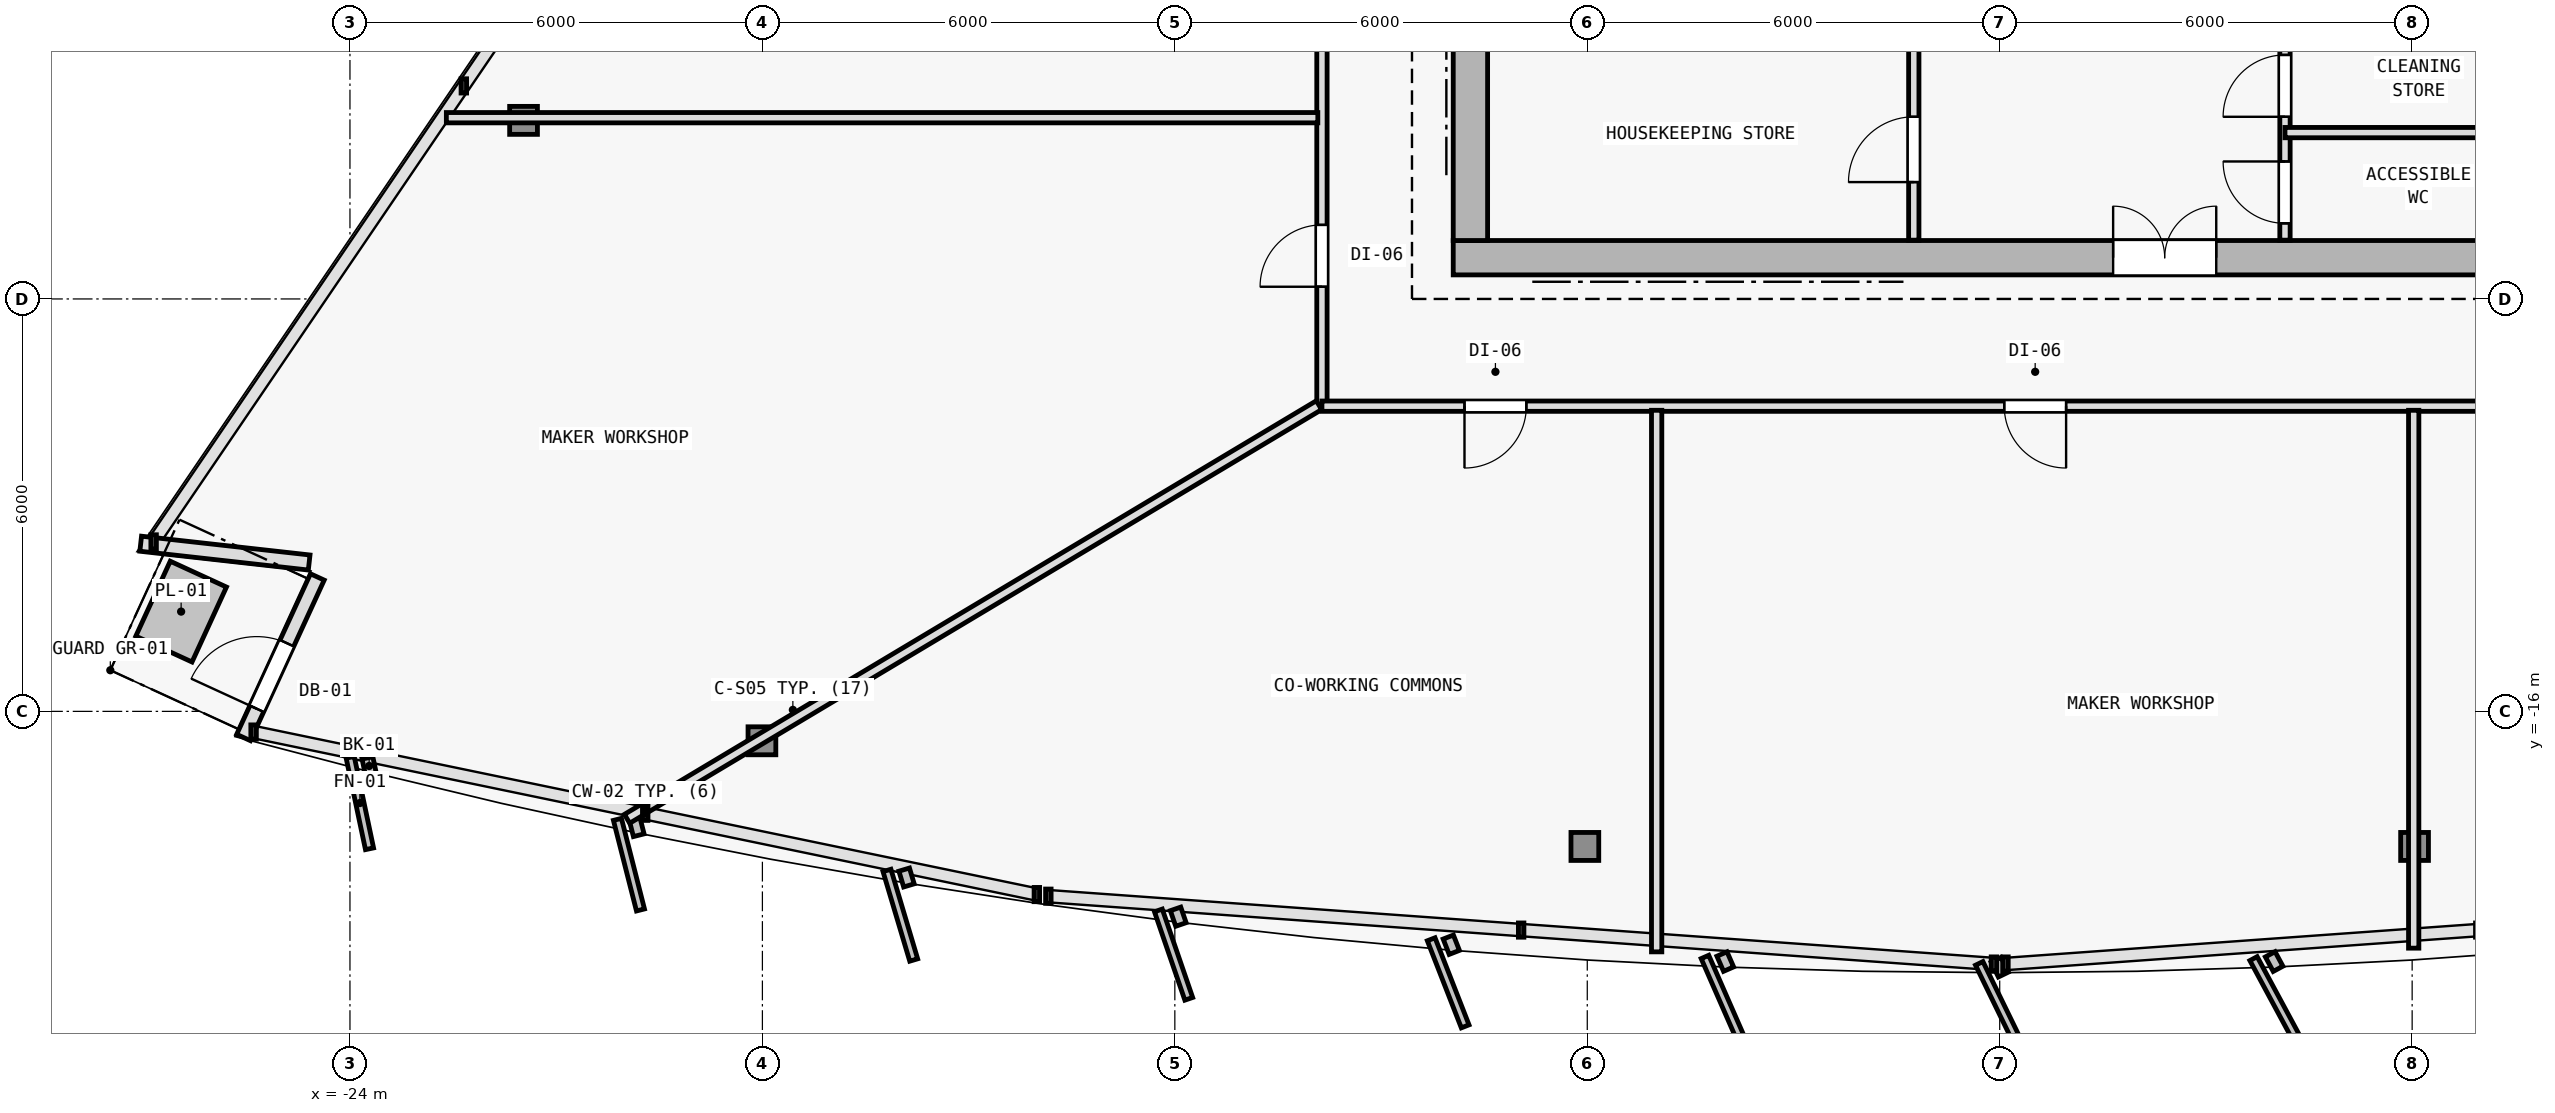
"""IFC4 building model, lengths in metres.
Left out: names, types, materials, properties, quantities, classifications, styles, units other than length and angle.
Written with IfcOpenShell. Run it as: python <this file> out.ifc"""

import sys

from ifc_helpers import new_model, si_unit, direction, frame, frame_2d, origin, origin_2d, place, context, subcontext, project, spatial, rectangle, i_section, extrude, element, fill, save


model = new_model("IFC4")
c1 = context("Model", 3, precision=1e-05, world=origin(), true_north=direction((0.0, 1.0)))
c2 = subcontext(c1, "Body", "Model", "MODEL_VIEW")
j1 = project(units=[si_unit("LENGTHUNIT", "METRE"), si_unit("PLANEANGLEUNIT", "RADIAN")], contexts=[c1])
p1 = place(None, origin())
s1 = spatial("IfcSite", under=j1, at=p1, CompositionType="ELEMENT")
p2 = place(p1, origin())
s2 = spatial("IfcBuilding", under=s1, at=p2, CompositionType="ELEMENT")
p3 = place(p2, frame((0.0, 0.0, 145.8)))
s3 = spatial("IfcBuildingStorey", under=s2, at=p3, CompositionType="ELEMENT", Elevation=145.8)
for number, where, z_axis, x_axis in (
    (1, (-7.7, -9.4, 0.0), (0.0, 0.0, 1.0), (1.0, 0.0, 0.0)),
    (2, (0.0, -9.4, 0.0), (0.0, 0.0, 1.0), (1.0, 0.0, 0.0)),
):
    element("IfcColumn", number, at=place(p3, frame(where, z_axis=z_axis, x_axis=x_axis)), inside=s3, PredefinedType="COLUMN", context=c2, shape_type="SweptSolid", body=[
        extrude(i_section(OverallWidth=0.404, OverallDepth=0.407, WebThickness=0.017, FlangeThickness=0.028, FilletRadius=0.015, at=origin_2d()), origin(), (0.0, 0.0, 1.0), 3.6),
    ])
p4 = place(p3, frame((-18.007, -16.428, 0.005), z_axis=(0.020662834962, 0.033509136961, 0.999224792022), x_axis=(-0.851183725565, 0.524867855115, 0.0)))
e3 = element("IfcColumn", 3, at=p4, inside=s3, PredefinedType="COLUMN", context=c2, shape_type="SweptSolid", body=[
    extrude(i_section(OverallWidth=0.404, OverallDepth=0.407, WebThickness=0.017, FlangeThickness=0.028, FilletRadius=0.015, at=origin_2d()), origin(), (0.0, 0.0, 1.0), 3.592),
])
for number, where, z_axis, x_axis in (
    (4, (-6.035, -17.965, 0.005), (0.007, 0.035, 0.999), (-0.982, 0.191, 0.0)),
    (5, (6.035, -17.965, 0.005), (-0.007, 0.035, 0.999), (-0.982, -0.191, 0.0)),
):
    element("IfcColumn", number, at=place(p3, frame(where, z_axis=z_axis, x_axis=x_axis)), inside=s3, PredefinedType="COLUMN", context=c2, shape_type="SweptSolid", body=[
        extrude(i_section(OverallWidth=0.404, OverallDepth=0.407, WebThickness=0.017, FlangeThickness=0.028, FilletRadius=0.015, at=origin_2d()), origin(), (0.0, 0.0, 1.0), 3.592),
    ])
p5 = place(p3, frame((-21.475, -7.402, 0.005), z_axis=(0.025222449659, 0.021619242565, 0.999448065876), x_axis=(-0.650791373456, 0.759256602365, 0.0)))
e6 = element("IfcColumn", 6, at=p5, inside=s3, PredefinedType="COLUMN", context=c2, shape_type="SweptSolid", body=[
    extrude(i_section(OverallWidth=0.404, OverallDepth=0.407, WebThickness=0.017, FlangeThickness=0.028, FilletRadius=0.015, at=origin_2d()), origin(), (0.0, 0.0, 1.0), 3.591),
])
p6 = place(p3, frame((-24.594, -13.834, 0.0), z_axis=(0.0, 0.0, 1.0), x_axis=(-0.993823222634, 0.110974781609, 0.0)))
e7 = element("IfcWall", 7, at=p6, inside=s3, PredefinedType="SOLIDWALL", context=c2, shape_type="SweptSolid", body=[
    extrude(rectangle(XDim=2.466, YDim=0.22, at=frame_2d((1.233, 0.0))), origin(), (0.0, 0.0, 1.0), 3.35),
])
p7 = place(p3, frame((-25.548, -16.38, 0.0), z_axis=(0.0, 0.0, 1.0), x_axis=(0.417449299542, 0.908700215864, 0.0)))
e8 = element("IfcWall", 8, at=p7, inside=s3, PredefinedType="SOLIDWALL", context=c2, shape_type="SweptSolid", body=[
    extrude(rectangle(XDim=2.57, YDim=0.22, at=frame_2d((1.285, 0.0))), origin(), (0.0, 0.0, 1.0), 3.35),
])
p8 = place(p7, frame((0.46, 0.0, 0.0)))
e9 = element("IfcOpeningElement", 9, at=p8, cuts=e8, PredefinedType="OPENING", context=c2, shape_type="SweptSolid", body=[
    extrude(rectangle(XDim=1.05, YDim=2.15, at=frame_2d((0.525, 1.075))), frame((0.0, 0.12, 0.0), z_axis=(0.0, -1.0, 0.0), x_axis=(1.0, 0.0, 0.0)), (0.0, 0.0, 1.0), 0.24),
])
p9 = place(p3, frame((-7.95, -9.4, 0.0), z_axis=(0.0, 0.0, 1.0), x_axis=(1.0, 0.0, 0.0)))
e10 = element("IfcWall", 10, at=p9, inside=s3, PredefinedType="SHEAR", context=c2, shape_type="SweptSolid", body=[
    extrude(rectangle(XDim=15.9, YDim=0.5, at=frame_2d((7.95, 0.0))), origin(), (0.0, 0.0, 1.0), 3.35),
])
p10 = place(p9, frame((9.6, 0.0, 0.0)))
e11 = element("IfcOpeningElement", 11, at=p10, cuts=e10, PredefinedType="OPENING", context=c2, shape_type="SweptSolid", body=[
    extrude(rectangle(XDim=1.5, YDim=2.2, at=frame_2d((0.75, 1.1))), frame((0.0, 0.26, 0.0), z_axis=(0.0, -1.0, 0.0), x_axis=(1.0, 0.0, 0.0)), (0.0, 0.0, 1.0), 0.52),
])
p11 = place(p3, frame((-7.7, -9.15, 0.0), z_axis=(0.0, 0.0, 1.0), x_axis=(0.0, 1.0, 0.0)))
e12 = element("IfcWall", 12, at=p11, inside=s3, PredefinedType="SHEAR", context=c2, shape_type="SweptSolid", body=[
    extrude(rectangle(XDim=19.1, YDim=0.5, at=frame_2d((9.55, 0.0))), origin(), (0.0, 0.0, 1.0), 3.35),
])
p12 = place(p11, frame((12.7, 0.0, 0.0)))
e13 = element("IfcOpeningElement", 13, at=p12, cuts=e12, PredefinedType="OPENING", context=c2, shape_type="SweptSolid", body=[
    extrude(rectangle(XDim=1.1, YDim=2.15, at=frame_2d((0.55, 1.075))), frame((0.0, 0.26, 0.0), z_axis=(0.0, -1.0, 0.0), x_axis=(1.0, 0.0, 0.0)), (0.0, 0.0, 1.0), 0.52),
])
p13 = place(p3, frame((-1.25, -9.145, 0.0), z_axis=(0.0, 0.0, 1.0), x_axis=(0.0, 1.0, 0.0)))
e14 = element("IfcWall", 14, at=p13, inside=s3, PredefinedType="PARTITIONING", context=c2, shape_type="SweptSolid", body=[
    extrude(rectangle(XDim=3.095, YDim=0.15, at=frame_2d((1.547, 0.0))), origin(), (0.0, 0.0, 1.0), 3.35),
])
p14 = place(p13, frame((0.845, 0.0, 0.0)))
e15 = element("IfcOpeningElement", 15, at=p14, cuts=e14, PredefinedType="OPENING", context=c2, shape_type="SweptSolid", body=[
    extrude(rectangle(XDim=0.95, YDim=2.1, at=frame_2d((0.475, 1.05))), frame((0.0, 0.085, 0.0), z_axis=(0.0, -1.0, 0.0), x_axis=(1.0, 0.0, 0.0)), (0.0, 0.0, 1.0), 0.17),
])
p15 = place(p3, frame((4.15, -9.145, 0.0), z_axis=(0.0, 0.0, 1.0), x_axis=(0.0, 1.0, 0.0)))
e16 = element("IfcWall", 16, at=p15, inside=s3, PredefinedType="PARTITIONING", context=c2, shape_type="SweptSolid", body=[
    extrude(rectangle(XDim=3.095, YDim=0.15, at=frame_2d((1.547, 0.0))), origin(), (0.0, 0.0, 1.0), 3.35),
])
p16 = place(p15, frame((0.245, 0.0, 0.0)))
e17 = element("IfcOpeningElement", 17, at=p16, cuts=e16, PredefinedType="OPENING", context=c2, shape_type="SweptSolid", body=[
    extrude(rectangle(XDim=0.9, YDim=2.1, at=frame_2d((0.45, 1.05))), frame((0.0, 0.085, 0.0), z_axis=(0.0, -1.0, 0.0), x_axis=(1.0, 0.0, 0.0)), (0.0, 0.0, 1.0), 0.17),
])
p17 = place(p15, frame((1.795, 0.0, 0.0)))
e18 = element("IfcOpeningElement", 18, at=p17, cuts=e16, PredefinedType="OPENING", context=c2, shape_type="SweptSolid", body=[
    extrude(rectangle(XDim=0.9, YDim=2.1, at=frame_2d((0.45, 1.05))), frame((0.0, 0.085, 0.0), z_axis=(0.0, -1.0, 0.0), x_axis=(1.0, 0.0, 0.0)), (0.0, 0.0, 1.0), 0.17),
])
p18 = place(p3, frame((4.15, -7.58, 0.0), z_axis=(0.0, 0.0, 1.0), x_axis=(1.0, 0.0, 0.0)))
e19 = element("IfcWall", 19, at=p18, inside=s3, PredefinedType="PARTITIONING", context=c2, shape_type="SweptSolid", body=[
    extrude(rectangle(XDim=3.295, YDim=0.15, at=frame_2d((1.647, 0.0))), origin(), (0.0, 0.0, 1.0), 3.35),
])
p19 = place(p3, frame((-9.86, -11.56, 0.0), z_axis=(0.0, 0.0, 1.0), x_axis=(0.0, 1.0, 0.0)))
e20 = element("IfcWall", 20, at=p19, inside=s3, PredefinedType="PARTITIONING", context=c2, shape_type="SweptSolid", body=[
    extrude(rectangle(XDim=19.986, YDim=0.15, at=frame_2d((9.993, 0.0))), origin(), (0.0, 0.0, 1.0), 2.775),
])
p20 = place(p19, frame((7.828, 0.0, 0.0)))
e21 = element("IfcOpeningElement", 21, at=p20, cuts=e20, PredefinedType="OPENING", context=c2, shape_type="SweptSolid", body=[
    extrude(rectangle(XDim=0.9, YDim=2.1, at=frame_2d((0.45, 1.05))), frame((0.0, 0.085, 0.0), z_axis=(0.0, -1.0, 0.0), x_axis=(1.0, 0.0, 0.0)), (0.0, 0.0, 1.0), 0.17),
])
p21 = place(p19, frame((1.738, 0.0, 0.0)))
e22 = element("IfcOpeningElement", 22, at=p21, cuts=e20, PredefinedType="OPENING", context=c2, shape_type="SweptSolid", body=[
    extrude(rectangle(XDim=0.9, YDim=2.1, at=frame_2d((0.45, 1.05))), frame((0.0, 0.085, 0.0), z_axis=(0.0, -1.0, 0.0), x_axis=(1.0, 0.0, 0.0)), (0.0, 0.0, 1.0), 0.17),
])
p22 = place(p19, frame((15.634, 0.0, 0.0)))
e23 = element("IfcOpeningElement", 23, at=p22, cuts=e20, PredefinedType="OPENING", context=c2, shape_type="SweptSolid", body=[
    extrude(rectangle(XDim=0.9, YDim=2.1, at=frame_2d((0.45, 1.05))), frame((0.0, 0.085, 0.0), z_axis=(0.0, -1.0, 0.0), x_axis=(1.0, 0.0, 0.0)), (0.0, 0.0, 1.0), 0.17),
])
p23 = place(p3, frame((13.18, -11.56, 0.0), z_axis=(0.0, 0.0, 1.0), x_axis=(-1.0, 0.0, 0.0)))
e24 = element("IfcWall", 24, at=p23, inside=s3, PredefinedType="PARTITIONING", context=c2, shape_type="SweptSolid", body=[
    extrude(rectangle(XDim=23.04, YDim=0.15, at=frame_2d((11.52, 0.0))), origin(), (0.0, 0.0, 1.0), 2.775),
])
p24 = place(p23, frame((20.066, 0.0, 0.0)))
e25 = element("IfcOpeningElement", 25, at=p24, cuts=e24, PredefinedType="OPENING", context=c2, shape_type="SweptSolid", body=[
    extrude(rectangle(XDim=0.9, YDim=2.1, at=frame_2d((0.45, 1.05))), frame((0.0, 0.085, 0.0), z_axis=(0.0, -1.0, 0.0), x_axis=(1.0, 0.0, 0.0)), (0.0, 0.0, 1.0), 0.17),
])
p25 = place(p23, frame((12.214, 0.0, 0.0)))
e26 = element("IfcOpeningElement", 26, at=p25, cuts=e24, PredefinedType="OPENING", context=c2, shape_type="SweptSolid", body=[
    extrude(rectangle(XDim=0.9, YDim=2.1, at=frame_2d((0.45, 1.05))), frame((0.0, 0.085, 0.0), z_axis=(0.0, -1.0, 0.0), x_axis=(1.0, 0.0, 0.0)), (0.0, 0.0, 1.0), 0.17),
])
p26 = place(p23, frame((3.218, 0.0, 0.0)))
e27 = element("IfcOpeningElement", 27, at=p26, cuts=e24, PredefinedType="OPENING", context=c2, shape_type="SweptSolid", body=[
    extrude(rectangle(XDim=0.9, YDim=2.1, at=frame_2d((0.45, 1.05))), frame((0.0, 0.085, 0.0), z_axis=(0.0, -1.0, 0.0), x_axis=(1.0, 0.0, 0.0)), (0.0, 0.0, 1.0), 0.17),
])
p27 = place(p3, frame((-9.903, -11.546, 0.0), z_axis=(0.0, 0.0, 1.0), x_axis=(-0.858336745587, -0.513086767687, 0.0)))
e28 = element("IfcWall", 28, at=p27, inside=s3, PredefinedType="PARTITIONING", context=c2, shape_type="SweptSolid", body=[
    extrude(rectangle(XDim=11.727, YDim=0.15, at=frame_2d((5.864, 0.0))), origin(), (0.0, 0.0, 1.0), 2.775),
])
p28 = place(p3, frame((6.023, -11.62, 0.0), z_axis=(0.0, 0.0, 1.0), x_axis=(0.0, -1.0, 0.0)))
e29 = element("IfcWall", 29, at=p28, inside=s3, PredefinedType="PARTITIONING", context=c2, shape_type="SweptSolid", body=[
    extrude(rectangle(XDim=7.825, YDim=0.15, at=frame_2d((3.912, 0.0))), origin(), (0.0, 0.0, 1.0), 2.885),
])
p29 = place(p3, frame((-9.92, -7.363, 0.0), z_axis=(0.0, 0.0, 1.0), x_axis=(-1.0, 0.0, 0.0)))
e30 = element("IfcWall", 30, at=p29, inside=s3, PredefinedType="PARTITIONING", context=c2, shape_type="SweptSolid", body=[
    extrude(rectangle(XDim=12.678, YDim=0.15, at=frame_2d((6.339, 0.0))), origin(), (0.0, 0.0, 1.0), 2.775),
])
p30 = place(p3, frame((-4.991, -11.62, 0.0), z_axis=(0.0, 0.0, 1.0), x_axis=(0.0, -1.0, 0.0)))
e31 = element("IfcWall", 31, at=p30, inside=s3, PredefinedType="PARTITIONING", context=c2, shape_type="SweptSolid", body=[
    extrude(rectangle(XDim=7.878, YDim=0.15, at=frame_2d((3.939, 0.0))), origin(), (0.0, 0.0, 1.0), 2.875),
])
p31 = place(p8, origin())
e32 = element("IfcDoor", 32, at=p31, inside=s3, OperationType="SINGLE_SWING_LEFT", PredefinedType="DOOR", context=c2, shape_type="SweptSolid", body=[
    extrude(rectangle(XDim=1.05, YDim=2.15, at=frame_2d((0.525, 1.075))), frame((0.0, 0.025, 0.0), z_axis=(0.0, -1.0, 0.0), x_axis=(1.0, 0.0, 0.0)), (0.0, 0.0, 1.0), 0.05),
])
fill(e9, e32)
p32 = place(p10, origin())
e33 = element("IfcDoor", 33, at=p32, inside=s3, OperationType="DOUBLE_DOOR_SINGLE_SWING", PredefinedType="DOOR", context=c2, shape_type="SweptSolid", body=[
    extrude(rectangle(XDim=1.5, YDim=2.2, at=frame_2d((0.75, 1.1))), frame((0.0, 0.025, 0.0), z_axis=(0.0, -1.0, 0.0), x_axis=(1.0, 0.0, 0.0)), (0.0, 0.0, 1.0), 0.05),
])
fill(e11, e33)
p33 = place(p14, origin())
e34 = element("IfcDoor", 34, at=p33, inside=s3, OperationType="SINGLE_SWING_LEFT", PredefinedType="DOOR", context=c2, shape_type="SweptSolid", body=[
    extrude(rectangle(XDim=0.95, YDim=2.1, at=frame_2d((0.475, 1.05))), frame((0.0, 0.025, 0.0), z_axis=(0.0, -1.0, 0.0), x_axis=(1.0, 0.0, 0.0)), (0.0, 0.0, 1.0), 0.05),
])
fill(e15, e34)
p34 = place(p16, origin())
e35 = element("IfcDoor", 35, at=p34, inside=s3, OperationType="SINGLE_SWING_RIGHT", PredefinedType="DOOR", context=c2, shape_type="SweptSolid", body=[
    extrude(rectangle(XDim=0.9, YDim=2.1, at=frame_2d((0.45, 1.05))), frame((0.0, 0.025, 0.0), z_axis=(0.0, -1.0, 0.0), x_axis=(1.0, 0.0, 0.0)), (0.0, 0.0, 1.0), 0.05),
])
fill(e17, e35)
p35 = place(p17, origin())
e36 = element("IfcDoor", 36, at=p35, inside=s3, OperationType="SINGLE_SWING_LEFT", PredefinedType="DOOR", context=c2, shape_type="SweptSolid", body=[
    extrude(rectangle(XDim=0.9, YDim=2.1, at=frame_2d((0.45, 1.05))), frame((0.0, 0.025, 0.0), z_axis=(0.0, -1.0, 0.0), x_axis=(1.0, 0.0, 0.0)), (0.0, 0.0, 1.0), 0.05),
])
fill(e18, e36)
p36 = place(p21, origin())
e37 = element("IfcDoor", 37, at=p36, inside=s3, OperationType="SINGLE_SWING_LEFT", PredefinedType="DOOR", context=c2, shape_type="SweptSolid", body=[
    extrude(rectangle(XDim=0.9, YDim=2.1, at=frame_2d((0.45, 1.05))), frame((0.0, 0.025, 0.0), z_axis=(0.0, -1.0, 0.0), x_axis=(1.0, 0.0, 0.0)), (0.0, 0.0, 1.0), 0.05),
])
fill(e22, e37)
p37 = place(p24, origin())
e38 = element("IfcDoor", 38, at=p37, inside=s3, OperationType="SINGLE_SWING_RIGHT", PredefinedType="DOOR", context=c2, shape_type="SweptSolid", body=[
    extrude(rectangle(XDim=0.9, YDim=2.1, at=frame_2d((0.45, 1.05))), frame((0.0, 0.025, 0.0), z_axis=(0.0, -1.0, 0.0), x_axis=(1.0, 0.0, 0.0)), (0.0, 0.0, 1.0), 0.05),
])
fill(e25, e38)
p38 = place(p25, origin())
e39 = element("IfcDoor", 39, at=p38, inside=s3, OperationType="SINGLE_SWING_LEFT", PredefinedType="DOOR", context=c2, shape_type="SweptSolid", body=[
    extrude(rectangle(XDim=0.9, YDim=2.1, at=frame_2d((0.45, 1.05))), frame((0.0, 0.025, 0.0), z_axis=(0.0, -1.0, 0.0), x_axis=(1.0, 0.0, 0.0)), (0.0, 0.0, 1.0), 0.05),
])
fill(e26, e39)
save(model, sys.argv[1])
